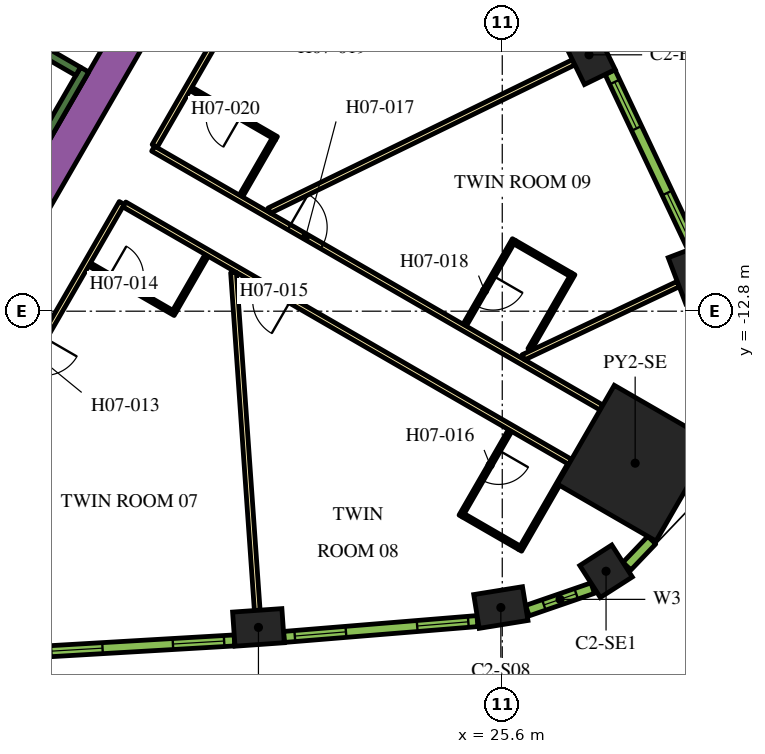
"""IFC4 building model, lengths in metres.
Left out: names, types, materials, properties, quantities, classifications, styles, units other than length and angle.
Written with IfcOpenShell. Run it as: python <this file> out.ifc"""

import sys

from ifc_helpers import new_model, si_unit, direction, frame, frame_2d, origin, origin_2d, place, context, subcontext, project, spatial, rectangle, extrude, element, fill, save


model = new_model("IFC4")
c1 = context("Model", 3, precision=1e-05, world=origin(), true_north=direction((0.0, 1.0)))
c2 = subcontext(c1, "Body", "Model", "MODEL_VIEW")
j1 = project(units=[si_unit("LENGTHUNIT", "METRE"), si_unit("PLANEANGLEUNIT", "RADIAN")], contexts=[c1])
p1 = place(None, origin())
s1 = spatial("IfcSite", under=j1, at=p1, CompositionType="ELEMENT")
p2 = place(p1, origin())
s2 = spatial("IfcBuilding", under=s1, at=p2, CompositionType="ELEMENT")
p3 = place(p2, frame((0.0, 0.0, 95.4)))
s3 = spatial("IfcBuildingStorey", under=s2, at=p3, CompositionType="ELEMENT", Elevation=95.4)
p4 = place(p3, frame((29.097, -16.799, 0.0), z_axis=(0.0, 0.0, 1.0), x_axis=(0.866025403784, -0.5, 0.0)))
e1 = element("IfcColumn", 1, at=p4, inside=s3, PredefinedType="COLUMN", context=c2, shape_type="SweptSolid", body=[
    extrude(rectangle(XDim=3.0, YDim=3.0, at=origin_2d()), origin(), (0.0, 0.0, 1.0), 3.9),
])
for number, where, z_axis, x_axis in (
    (2, (19.184, -21.12, 0.0), (0.0, 0.0, 1.0), (0.998, 0.07, 0.0)),
    (3, (25.563, -20.597, 0.0), (0.0, 0.0, 1.0), (0.987, 0.159, 0.0)),
):
    element("IfcColumn", number, at=place(p3, frame(where, z_axis=z_axis, x_axis=x_axis)), inside=s3, PredefinedType="COLUMN", context=c2, shape_type="SweptSolid", body=[
        extrude(rectangle(XDim=1.3, YDim=0.9, at=origin_2d()), origin(), (0.0, 0.0, 1.0), 3.9),
    ])
p5 = place(p3, frame((28.331, -19.643, 0.0), z_axis=(0.0, 0.0, 1.0), x_axis=(0.841700252504, 0.53994507585, 0.0)))
e4 = element("IfcColumn", 4, at=p5, inside=s3, PredefinedType="COLUMN", context=c2, shape_type="SweptSolid", body=[
    extrude(rectangle(XDim=1.0, YDim=1.0, at=origin_2d()), origin(), (0.0, 0.0, 1.0), 3.9),
])
for number, where, z_axis, x_axis in (
    (5, (30.619, -11.839, 0.0), (0.0, 0.0, 1.0), (-0.355, 0.935, 0.0)),
    (6, (27.883, -6.054, 0.0), (0.0, 0.0, 1.0), (-0.438, 0.899, 0.0)),
):
    element("IfcColumn", number, at=place(p3, frame(where, z_axis=z_axis, x_axis=x_axis)), inside=s3, PredefinedType="COLUMN", context=c2, shape_type="SweptSolid", body=[
        extrude(rectangle(XDim=1.3, YDim=0.9, at=origin_2d()), origin(), (0.0, 0.0, 1.0), 3.9),
    ])
p6 = place(p3, frame((11.695, -12.644, 0.0), z_axis=(0.0, 0.0, 1.0), x_axis=(0.500010229568, 0.86601949766, 0.0)))
e7 = element("IfcWall", 7, at=p6, inside=s3, PredefinedType="SOLIDWALL", context=c2, shape_type="SweptSolid", body=[
    extrude(rectangle(XDim=9.326, YDim=0.9, at=frame_2d((4.663, 0.0))), origin(), (0.0, 0.0, 1.0), 3.9),
])
p7 = place(p3, frame((12.885, -9.431, 0.0), z_axis=(0.0, 0.0, 1.0), x_axis=(0.500020560727, 0.866013532718, 0.0)))
e8 = element("IfcWall", 8, at=p7, inside=s3, PredefinedType="SOLIDWALL", context=c2, shape_type="SweptSolid", body=[
    extrude(rectangle(XDim=3.45, YDim=0.25, at=frame_2d((1.725, 0.0))), origin(), (0.0, 0.0, 1.0), 3.9),
])
p8 = place(p3, frame((8.334, -2.964, 0.0), z_axis=(0.0, 0.0, 1.0), x_axis=(0.866016039709, -0.500016218704, 0.0)))
e9 = element("IfcWall", 9, at=p8, inside=s3, PredefinedType="SOLIDWALL", context=c2, shape_type="SweptSolid", body=[
    extrude(rectangle(XDim=7.05, YDim=0.25, at=frame_2d((3.525, 0.0))), origin(), (0.0, 0.0, 1.0), 3.9),
])
p9 = place(p3, frame((16.412, -8.523, 0.0), z_axis=(0.0, 0.0, 1.0), x_axis=(0.866025629663, -0.499999608766, 0.0)))
e10 = element("IfcWall", 10, at=p9, inside=s3, PredefinedType="PARTITIONING", context=c2, shape_type="SweptSolid", body=[
    extrude(rectangle(XDim=13.624, YDim=0.15, at=frame_2d((6.812, 0.0))), origin(), (0.0, 0.0, 1.0), 2.75),
])
p10 = place(p9, frame((4.134, 0.0, 0.0)))
e11 = element("IfcOpeningElement", 11, at=p10, cuts=e10, PredefinedType="OPENING", context=c2, shape_type="SweptSolid", body=[
    extrude(rectangle(XDim=1.0, YDim=2.1, at=frame_2d((0.5, 1.05))), frame((0.0, 0.085, 0.0), z_axis=(0.0, -1.0, 0.0), x_axis=(1.0, 0.0, 0.0)), (0.0, 0.0, 1.0), 0.17),
])
p11 = place(p3, frame((19.081, -3.9, 0.0), z_axis=(0.0, 0.0, 1.0), x_axis=(-0.499974327079, -0.866040225545, 0.0)))
e12 = element("IfcWall", 12, at=p11, inside=s3, PredefinedType="PARTITIONING", context=c2, shape_type="SweptSolid", body=[
    extrude(rectangle(XDim=5.258, YDim=0.15, at=frame_2d((2.629, 0.0))), origin(), (0.0, 0.0, 1.0), 2.75),
])
p12 = place(p11, frame((0.18, 0.0, 0.0)))
e13 = element("IfcOpeningElement", 13, at=p12, cuts=e12, PredefinedType="OPENING", context=c2, shape_type="SweptSolid", body=[
    extrude(rectangle(XDim=1.0, YDim=2.1, at=frame_2d((0.5, 1.05))), frame((0.0, 0.085, 0.0), z_axis=(0.0, -1.0, 0.0), x_axis=(1.0, 0.0, 0.0)), (0.0, 0.0, 1.0), 0.17),
])
p13 = place(p3, frame((15.587, -9.952, 0.0), z_axis=(0.0, 0.0, 1.0), x_axis=(-0.500016618951, -0.866015808616, 0.0)))
e14 = element("IfcWall", 14, at=p13, inside=s3, PredefinedType="PARTITIONING", context=c2, shape_type="SweptSolid", body=[
    extrude(rectangle(XDim=5.268, YDim=0.15, at=frame_2d((2.634, 0.0))), origin(), (0.0, 0.0, 1.0), 2.75),
])
p14 = place(p13, frame((4.088, 0.0, 0.0)))
e15 = element("IfcOpeningElement", 15, at=p14, cuts=e14, PredefinedType="OPENING", context=c2, shape_type="SweptSolid", body=[
    extrude(rectangle(XDim=1.0, YDim=2.1, at=frame_2d((0.5, 1.05))), frame((0.0, 0.085, 0.0), z_axis=(0.0, -1.0, 0.0), x_axis=(1.0, 0.0, 0.0)), (0.0, 0.0, 1.0), 0.17),
])
p15 = place(p3, frame((27.386, -16.764, 0.0), z_axis=(0.0, 0.0, 1.0), x_axis=(-0.866022585856, 0.500004880763, 0.0)))
e16 = element("IfcWall", 16, at=p15, inside=s3, PredefinedType="PARTITIONING", context=c2, shape_type="SweptSolid", body=[
    extrude(rectangle(XDim=13.544, YDim=0.15, at=frame_2d((6.772, 0.0))), origin(), (0.0, 0.0, 1.0), 2.75),
])
p16 = place(p15, frame((8.491, 0.0, 0.0)))
e17 = element("IfcOpeningElement", 17, at=p16, cuts=e16, PredefinedType="OPENING", context=c2, shape_type="SweptSolid", body=[
    extrude(rectangle(XDim=1.0, YDim=2.1, at=frame_2d((0.5, 1.05))), frame((0.0, 0.085, 0.0), z_axis=(0.0, -1.0, 0.0), x_axis=(1.0, 0.0, 0.0)), (0.0, 0.0, 1.0), 0.17),
])
p17 = place(p3, frame((19.153, -20.671, 0.0), z_axis=(0.0, 0.0, 1.0), x_axis=(-0.070070736723, 0.997542025107, 0.0)))
e18 = element("IfcWall", 18, at=p17, inside=s3, PredefinedType="PARTITIONING", context=c2, shape_type="SweptSolid", body=[
    extrude(rectangle(XDim=8.909, YDim=0.15, at=frame_2d((4.455, 0.0))), origin(), (0.0, 0.0, 1.0), 2.75),
])
p18 = place(p3, frame((27.479, -6.251, 0.0), z_axis=(0.0, 0.0, 1.0), x_axis=(-0.898945877276, -0.438059710231, 0.0)))
e19 = element("IfcWall", 19, at=p18, inside=s3, PredefinedType="PARTITIONING", context=c2, shape_type="SweptSolid", body=[
    extrude(rectangle(XDim=8.909, YDim=0.15, at=frame_2d((4.455, 0.0))), origin(), (0.0, 0.0, 1.0), 2.75),
])
p19 = place(p3, frame((30.231, -12.085, 0.0), z_axis=(0.0, 0.0, 1.0), x_axis=(-0.904001132572, -0.427530060122, 0.0)))
e20 = element("IfcWall", 20, at=p19, inside=s3, PredefinedType="PARTITIONING", context=c2, shape_type="SweptSolid", body=[
    extrude(rectangle(XDim=4.51, YDim=0.15, at=frame_2d((2.255, 0.0))), origin(), (0.0, 0.0, 1.0), 2.75),
])
p20 = place(p3, frame((14.74, -11.57, 0.0), z_axis=(0.0, 0.0, 1.0), x_axis=(0.866021400173, -0.500006934395, 0.0)))
e21 = element("IfcWall", 21, at=p20, inside=s3, PredefinedType="PARTITIONING", context=c2, shape_type="SweptSolid", body=[
    extrude(rectangle(XDim=2.6, YDim=0.1, at=frame_2d((1.3, 0.0))), origin(), (0.0, 0.0, 1.0), 2.75),
])
p21 = place(p20, frame((0.6, 0.0, 0.0)))
e22 = element("IfcOpeningElement", 22, at=p21, cuts=e21, PredefinedType="OPENING", context=c2, shape_type="SweptSolid", body=[
    extrude(rectangle(XDim=0.9, YDim=2.1, at=frame_2d((0.45, 1.05))), frame((0.0, 0.06, 0.0), z_axis=(0.0, -1.0, 0.0), x_axis=(1.0, 0.0, 0.0)), (0.0, 0.0, 1.0), 0.12),
])
p22 = place(p3, frame((16.978, -12.793, 0.0), z_axis=(0.0, 0.0, 1.0), x_axis=(0.500147619332, 0.865940158947, 0.0)))
e23 = element("IfcWall", 23, at=p22, inside=s3, PredefinedType="PARTITIONING", context=c2, shape_type="SweptSolid", body=[
    extrude(rectangle(XDim=1.69, YDim=0.1, at=frame_2d((0.845, 0.0))), origin(), (0.0, 0.0, 1.0), 2.75),
])
p23 = place(p3, frame((25.807, -15.939, 0.0), z_axis=(0.0, 0.0, 1.0), x_axis=(-0.500006934395, -0.866021400173, 0.0)))
e24 = element("IfcWall", 24, at=p23, inside=s3, PredefinedType="PARTITIONING", context=c2, shape_type="SweptSolid", body=[
    extrude(rectangle(XDim=2.6, YDim=0.1, at=frame_2d((1.3, 0.0))), origin(), (0.0, 0.0, 1.0), 2.75),
])
p24 = place(p23, frame((0.6, 0.0, 0.0)))
e25 = element("IfcOpeningElement", 25, at=p24, cuts=e24, PredefinedType="OPENING", context=c2, shape_type="SweptSolid", body=[
    extrude(rectangle(XDim=0.9, YDim=2.1, at=frame_2d((0.45, 1.05))), frame((0.0, 0.06, 0.0), z_axis=(0.0, -1.0, 0.0), x_axis=(1.0, 0.0, 0.0)), (0.0, 0.0, 1.0), 0.12),
])
p25 = place(p3, frame((24.575, -18.172, 0.0), z_axis=(0.0, 0.0, 1.0), x_axis=(0.865989465428, -0.500062241894, 0.0)))
e26 = element("IfcWall", 26, at=p25, inside=s3, PredefinedType="PARTITIONING", context=c2, shape_type="SweptSolid", body=[
    extrude(rectangle(XDim=1.7, YDim=0.1, at=frame_2d((0.85, 0.0))), origin(), (0.0, 0.0, 1.0), 2.75),
])
p26 = place(p3, frame((27.365, -16.839, 0.0), z_axis=(0.0, 0.0, 1.0), x_axis=(-0.500006934395, -0.866021400173, 0.0)))
e27 = element("IfcWall", 27, at=p26, inside=s3, PredefinedType="PARTITIONING", context=c2, shape_type="SweptSolid", body=[
    extrude(rectangle(XDim=2.6, YDim=0.1, at=frame_2d((1.3, 0.0))), origin(), (0.0, 0.0, 1.0), 2.75),
])
p27 = place(p3, frame((25.91, -10.918, 0.0), z_axis=(0.0, 0.0, 1.0), x_axis=(-0.500006934395, -0.866021400173, 0.0)))
e28 = element("IfcWall", 28, at=p27, inside=s3, PredefinedType="PARTITIONING", context=c2, shape_type="SweptSolid", body=[
    extrude(rectangle(XDim=2.6, YDim=0.1, at=frame_2d((1.3, 0.0))), origin(), (0.0, 0.0, 1.0), 2.75),
])
p28 = place(p27, frame((1.1, 0.0, 0.0)))
e29 = element("IfcOpeningElement", 29, at=p28, cuts=e28, PredefinedType="OPENING", context=c2, shape_type="SweptSolid", body=[
    extrude(rectangle(XDim=0.9, YDim=2.1, at=frame_2d((0.45, 1.05))), frame((0.0, 0.06, 0.0), z_axis=(0.0, -1.0, 0.0), x_axis=(1.0, 0.0, 0.0)), (0.0, 0.0, 1.0), 0.12),
])
p29 = place(p3, frame((25.928, -10.986, 0.0), z_axis=(0.0, 0.0, 1.0), x_axis=(0.866025371046, -0.500000056704, 0.0)))
e30 = element("IfcWall", 30, at=p29, inside=s3, PredefinedType="PARTITIONING", context=c2, shape_type="SweptSolid", body=[
    extrude(rectangle(XDim=1.7, YDim=0.1, at=frame_2d((0.85, 0.0))), origin(), (0.0, 0.0, 1.0), 2.75),
])
p30 = place(p3, frame((26.319, -13.81, 0.0), z_axis=(0.0, 0.0, 1.0), x_axis=(0.499952165731, 0.866053019151, 0.0)))
e31 = element("IfcWall", 31, at=p30, inside=s3, PredefinedType="PARTITIONING", context=c2, shape_type="SweptSolid", body=[
    extrude(rectangle(XDim=2.3, YDim=0.1, at=frame_2d((1.15, 0.0))), origin(), (0.0, 0.0, 1.0), 2.75),
])
p31 = place(p3, frame((19.659, -8.25, 0.0), z_axis=(0.0, 0.0, 1.0), x_axis=(-0.866021400173, 0.500006934395, 0.0)))
e32 = element("IfcWall", 32, at=p31, inside=s3, PredefinedType="PARTITIONING", context=c2, shape_type="SweptSolid", body=[
    extrude(rectangle(XDim=2.6, YDim=0.1, at=frame_2d((1.3, 0.0))), origin(), (0.0, 0.0, 1.0), 2.75),
])
p32 = place(p31, frame((1.1, 0.0, 0.0)))
e33 = element("IfcOpeningElement", 33, at=p32, cuts=e32, PredefinedType="OPENING", context=c2, shape_type="SweptSolid", body=[
    extrude(rectangle(XDim=0.9, YDim=2.1, at=frame_2d((0.45, 1.05))), frame((0.0, 0.06, 0.0), z_axis=(0.0, -1.0, 0.0), x_axis=(1.0, 0.0, 0.0)), (0.0, 0.0, 1.0), 0.12),
])
p33 = place(p3, frame((19.591, -8.268, 0.0), z_axis=(0.0, 0.0, 1.0), x_axis=(-0.500040090343, -0.866002256377, 0.0)))
e34 = element("IfcWall", 34, at=p33, inside=s3, PredefinedType="PARTITIONING", context=c2, shape_type="SweptSolid", body=[
    extrude(rectangle(XDim=1.73, YDim=0.1, at=frame_2d((0.865, 0.0))), origin(), (0.0, 0.0, 1.0), 2.75),
])
p34 = place(p3, frame((13.462, -21.761, 0.0), z_axis=(0.0, 0.0, 1.0), x_axis=(0.998290511436, 0.058447025388, 0.0)))
e35 = element("IfcWall", 35, at=p34, inside=s3, PredefinedType="SOLIDWALL", context=c2, shape_type="SweptSolid", body=[
    extrude(rectangle(XDim=5.1, YDim=0.29, at=frame_2d((2.55, 0.0))), origin(), (0.0, 0.0, 1.0), 3.65),
])
p35 = place(p34, frame((0.272, 0.0, 0.9)))
e36 = element("IfcOpeningElement", 36, at=p35, cuts=e35, PredefinedType="OPENING", context=c2, shape_type="SweptSolid", body=[
    extrude(rectangle(XDim=1.35, YDim=2.15, at=frame_2d((0.675, 1.075))), frame((0.0, 0.155, 0.0), z_axis=(0.0, -1.0, 0.0), x_axis=(1.0, 0.0, 0.0)), (0.0, 0.0, 1.0), 0.31),
])
p36 = place(p34, frame((3.478, 0.0, 0.9)))
e37 = element("IfcOpeningElement", 37, at=p36, cuts=e35, PredefinedType="OPENING", context=c2, shape_type="SweptSolid", body=[
    extrude(rectangle(XDim=1.35, YDim=2.15, at=frame_2d((0.675, 1.075))), frame((0.0, 0.155, 0.0), z_axis=(0.0, -1.0, 0.0), x_axis=(1.0, 0.0, 0.0)), (0.0, 0.0, 1.0), 0.31),
])
p37 = place(p3, frame((19.857, -21.371, 0.0), z_axis=(0.0, 0.0, 1.0), x_axis=(0.99665273362, 0.081751627308, 0.0)))
e38 = element("IfcWall", 38, at=p37, inside=s3, PredefinedType="SOLIDWALL", context=c2, shape_type="SweptSolid", body=[
    extrude(rectangle(XDim=5.107, YDim=0.29, at=frame_2d((2.553, 0.0))), origin(), (0.0, 0.0, 1.0), 3.65),
])
p38 = place(p37, frame((0.285, 0.0, 0.9)))
e39 = element("IfcOpeningElement", 39, at=p38, cuts=e38, PredefinedType="OPENING", context=c2, shape_type="SweptSolid", body=[
    extrude(rectangle(XDim=1.35, YDim=2.15, at=frame_2d((0.675, 1.075))), frame((0.0, 0.155, 0.0), z_axis=(0.0, -1.0, 0.0), x_axis=(1.0, 0.0, 0.0)), (0.0, 0.0, 1.0), 0.31),
])
p39 = place(p37, frame((3.516, 0.0, 0.9)))
e40 = element("IfcOpeningElement", 40, at=p39, cuts=e38, PredefinedType="OPENING", context=c2, shape_type="SweptSolid", body=[
    extrude(rectangle(XDim=1.35, YDim=2.15, at=frame_2d((0.675, 1.075))), frame((0.0, 0.155, 0.0), z_axis=(0.0, -1.0, 0.0), x_axis=(1.0, 0.0, 0.0)), (0.0, 0.0, 1.0), 0.31),
])
p40 = place(p3, frame((26.261, -20.679, 0.0), z_axis=(0.0, 0.0, 1.0), x_axis=(0.945385815453, 0.325953462844, 0.0)))
e41 = element("IfcWall", 41, at=p40, inside=s3, PredefinedType="SOLIDWALL", context=c2, shape_type="SweptSolid", body=[
    extrude(rectangle(XDim=1.819, YDim=0.29, at=frame_2d((0.91, 0.0))), origin(), (0.0, 0.0, 1.0), 3.65),
])
p41 = place(p40, frame((0.46, 0.0, 0.9)))
e42 = element("IfcOpeningElement", 42, at=p41, cuts=e41, PredefinedType="OPENING", context=c2, shape_type="SweptSolid", body=[
    extrude(rectangle(XDim=0.9, YDim=2.15, at=frame_2d((0.45, 1.075))), frame((0.0, 0.155, 0.0), z_axis=(0.0, -1.0, 0.0), x_axis=(1.0, 0.0, 0.0)), (0.0, 0.0, 1.0), 0.31),
])
p42 = place(p3, frame((28.88, -19.509, 0.0), z_axis=(0.0, 0.0, 1.0), x_axis=(0.690414427296, 0.723414071319, 0.0)))
e43 = element("IfcWall", 43, at=p42, inside=s3, PredefinedType="SOLIDWALL", context=c2, shape_type="SweptSolid", body=[
    extrude(rectangle(XDim=0.947, YDim=0.29, at=frame_2d((0.474, 0.0))), origin(), (0.0, 0.0, 1.0), 3.65),
])
p43 = place(p3, frame((30.62, -11.127, 0.0), z_axis=(0.0, 0.0, 1.0), x_axis=(-0.427543726596, 0.903994669148, 0.0)))
e44 = element("IfcWall", 44, at=p43, inside=s3, PredefinedType="SOLIDWALL", context=c2, shape_type="SweptSolid", body=[
    extrude(rectangle(XDim=5.107, YDim=0.29, at=frame_2d((2.553, 0.0))), origin(), (0.0, 0.0, 1.0), 3.65),
])
p44 = place(p43, frame((0.24, 0.0, 0.9)))
e45 = element("IfcOpeningElement", 45, at=p44, cuts=e44, PredefinedType="OPENING", context=c2, shape_type="SweptSolid", body=[
    extrude(rectangle(XDim=1.35, YDim=2.15, at=frame_2d((0.675, 1.075))), frame((0.0, 0.155, 0.0), z_axis=(0.0, -1.0, 0.0), x_axis=(1.0, 0.0, 0.0)), (0.0, 0.0, 1.0), 0.31),
])
p45 = place(p43, frame((3.471, 0.0, 0.9)))
e46 = element("IfcOpeningElement", 46, at=p45, cuts=e44, PredefinedType="OPENING", context=c2, shape_type="SweptSolid", body=[
    extrude(rectangle(XDim=1.35, YDim=2.15, at=frame_2d((0.675, 1.075))), frame((0.0, 0.155, 0.0), z_axis=(0.0, -1.0, 0.0), x_axis=(1.0, 0.0, 0.0)), (0.0, 0.0, 1.0), 0.31),
])
p46 = place(p21, origin())
e47 = element("IfcDoor", 47, at=p46, inside=s3, OperationType="SINGLE_SWING_LEFT", PredefinedType="DOOR", context=c2, shape_type="SweptSolid", body=[
    extrude(rectangle(XDim=0.9, YDim=2.1, at=frame_2d((0.45, 1.05))), frame((0.0, 0.025, 0.0), z_axis=(0.0, -1.0, 0.0), x_axis=(1.0, 0.0, 0.0)), (0.0, 0.0, 1.0), 0.05),
])
fill(e22, e47)
p47 = place(p16, origin())
e48 = element("IfcDoor", 48, at=p47, inside=s3, OperationType="SINGLE_SWING_RIGHT", PredefinedType="DOOR", context=c2, shape_type="SweptSolid", body=[
    extrude(rectangle(XDim=1.0, YDim=2.1, at=frame_2d((0.5, 1.05))), frame((0.0, 0.025, 0.0), z_axis=(0.0, -1.0, 0.0), x_axis=(1.0, 0.0, 0.0)), (0.0, 0.0, 1.0), 0.05),
])
fill(e17, e48)
p48 = place(p24, origin())
e49 = element("IfcDoor", 49, at=p48, inside=s3, OperationType="SINGLE_SWING_LEFT", PredefinedType="DOOR", context=c2, shape_type="SweptSolid", body=[
    extrude(rectangle(XDim=0.9, YDim=2.1, at=frame_2d((0.45, 1.05))), frame((0.0, 0.025, 0.0), z_axis=(0.0, -1.0, 0.0), x_axis=(1.0, 0.0, 0.0)), (0.0, 0.0, 1.0), 0.05),
])
fill(e25, e49)
p49 = place(p10, origin())
e50 = element("IfcDoor", 50, at=p49, inside=s3, OperationType="SINGLE_SWING_LEFT", PredefinedType="DOOR", context=c2, shape_type="SweptSolid", body=[
    extrude(rectangle(XDim=1.0, YDim=2.1, at=frame_2d((0.5, 1.05))), frame((0.0, 0.025, 0.0), z_axis=(0.0, -1.0, 0.0), x_axis=(1.0, 0.0, 0.0)), (0.0, 0.0, 1.0), 0.05),
])
fill(e11, e50)
p50 = place(p28, origin())
e51 = element("IfcDoor", 51, at=p50, inside=s3, OperationType="SINGLE_SWING_RIGHT", PredefinedType="DOOR", context=c2, shape_type="SweptSolid", body=[
    extrude(rectangle(XDim=0.9, YDim=2.1, at=frame_2d((0.45, 1.05))), frame((0.0, 0.025, 0.0), z_axis=(0.0, -1.0, 0.0), x_axis=(1.0, 0.0, 0.0)), (0.0, 0.0, 1.0), 0.05),
])
fill(e29, e51)
p51 = place(p32, origin())
e52 = element("IfcDoor", 52, at=p51, inside=s3, OperationType="SINGLE_SWING_LEFT", PredefinedType="DOOR", context=c2, shape_type="SweptSolid", body=[
    extrude(rectangle(XDim=0.9, YDim=2.1, at=frame_2d((0.45, 1.05))), frame((0.0, 0.025, 0.0), z_axis=(0.0, -1.0, 0.0), x_axis=(1.0, 0.0, 0.0)), (0.0, 0.0, 1.0), 0.05),
])
fill(e33, e52)
p52 = place(p35, origin())
e53 = element("IfcWindow", 53, at=p52, inside=s3, PartitioningType="DOUBLE_PANEL_VERTICAL", PredefinedType="WINDOW", context=c2, shape_type="SweptSolid", body=[
    extrude(rectangle(XDim=1.35, YDim=2.15, at=frame_2d((0.675, 1.075))), frame((0.0, 0.015, 0.0), z_axis=(0.0, -1.0, 0.0), x_axis=(1.0, 0.0, 0.0)), (0.0, 0.0, 1.0), 0.06),
])
fill(e36, e53)
p53 = place(p36, origin())
e54 = element("IfcWindow", 54, at=p53, inside=s3, PartitioningType="DOUBLE_PANEL_VERTICAL", PredefinedType="WINDOW", context=c2, shape_type="SweptSolid", body=[
    extrude(rectangle(XDim=1.35, YDim=2.15, at=frame_2d((0.675, 1.075))), frame((0.0, 0.015, 0.0), z_axis=(0.0, -1.0, 0.0), x_axis=(1.0, 0.0, 0.0)), (0.0, 0.0, 1.0), 0.06),
])
fill(e37, e54)
p54 = place(p38, origin())
e55 = element("IfcWindow", 55, at=p54, inside=s3, PartitioningType="DOUBLE_PANEL_VERTICAL", PredefinedType="WINDOW", context=c2, shape_type="SweptSolid", body=[
    extrude(rectangle(XDim=1.35, YDim=2.15, at=frame_2d((0.675, 1.075))), frame((0.0, 0.015, 0.0), z_axis=(0.0, -1.0, 0.0), x_axis=(1.0, 0.0, 0.0)), (0.0, 0.0, 1.0), 0.06),
])
fill(e39, e55)
p55 = place(p39, origin())
e56 = element("IfcWindow", 56, at=p55, inside=s3, PartitioningType="DOUBLE_PANEL_VERTICAL", PredefinedType="WINDOW", context=c2, shape_type="SweptSolid", body=[
    extrude(rectangle(XDim=1.35, YDim=2.15, at=frame_2d((0.675, 1.075))), frame((0.0, 0.015, 0.0), z_axis=(0.0, -1.0, 0.0), x_axis=(1.0, 0.0, 0.0)), (0.0, 0.0, 1.0), 0.06),
])
fill(e40, e56)
p56 = place(p41, origin())
e57 = element("IfcWindow", 57, at=p56, inside=s3, PartitioningType="SINGLE_PANEL", PredefinedType="WINDOW", context=c2, shape_type="SweptSolid", body=[
    extrude(rectangle(XDim=0.9, YDim=2.15, at=frame_2d((0.45, 1.075))), frame((0.0, 0.015, 0.0), z_axis=(0.0, -1.0, 0.0), x_axis=(1.0, 0.0, 0.0)), (0.0, 0.0, 1.0), 0.06),
])
fill(e42, e57)
p57 = place(p44, origin())
e58 = element("IfcWindow", 58, at=p57, inside=s3, PartitioningType="DOUBLE_PANEL_VERTICAL", PredefinedType="WINDOW", context=c2, shape_type="SweptSolid", body=[
    extrude(rectangle(XDim=1.35, YDim=2.15, at=frame_2d((0.675, 1.075))), frame((0.0, 0.015, 0.0), z_axis=(0.0, -1.0, 0.0), x_axis=(1.0, 0.0, 0.0)), (0.0, 0.0, 1.0), 0.06),
])
fill(e45, e58)
p58 = place(p45, origin())
e59 = element("IfcWindow", 59, at=p58, inside=s3, PartitioningType="DOUBLE_PANEL_VERTICAL", PredefinedType="WINDOW", context=c2, shape_type="SweptSolid", body=[
    extrude(rectangle(XDim=1.35, YDim=2.15, at=frame_2d((0.675, 1.075))), frame((0.0, 0.015, 0.0), z_axis=(0.0, -1.0, 0.0), x_axis=(1.0, 0.0, 0.0)), (0.0, 0.0, 1.0), 0.06),
])
fill(e46, e59)
save(model, sys.argv[1])
